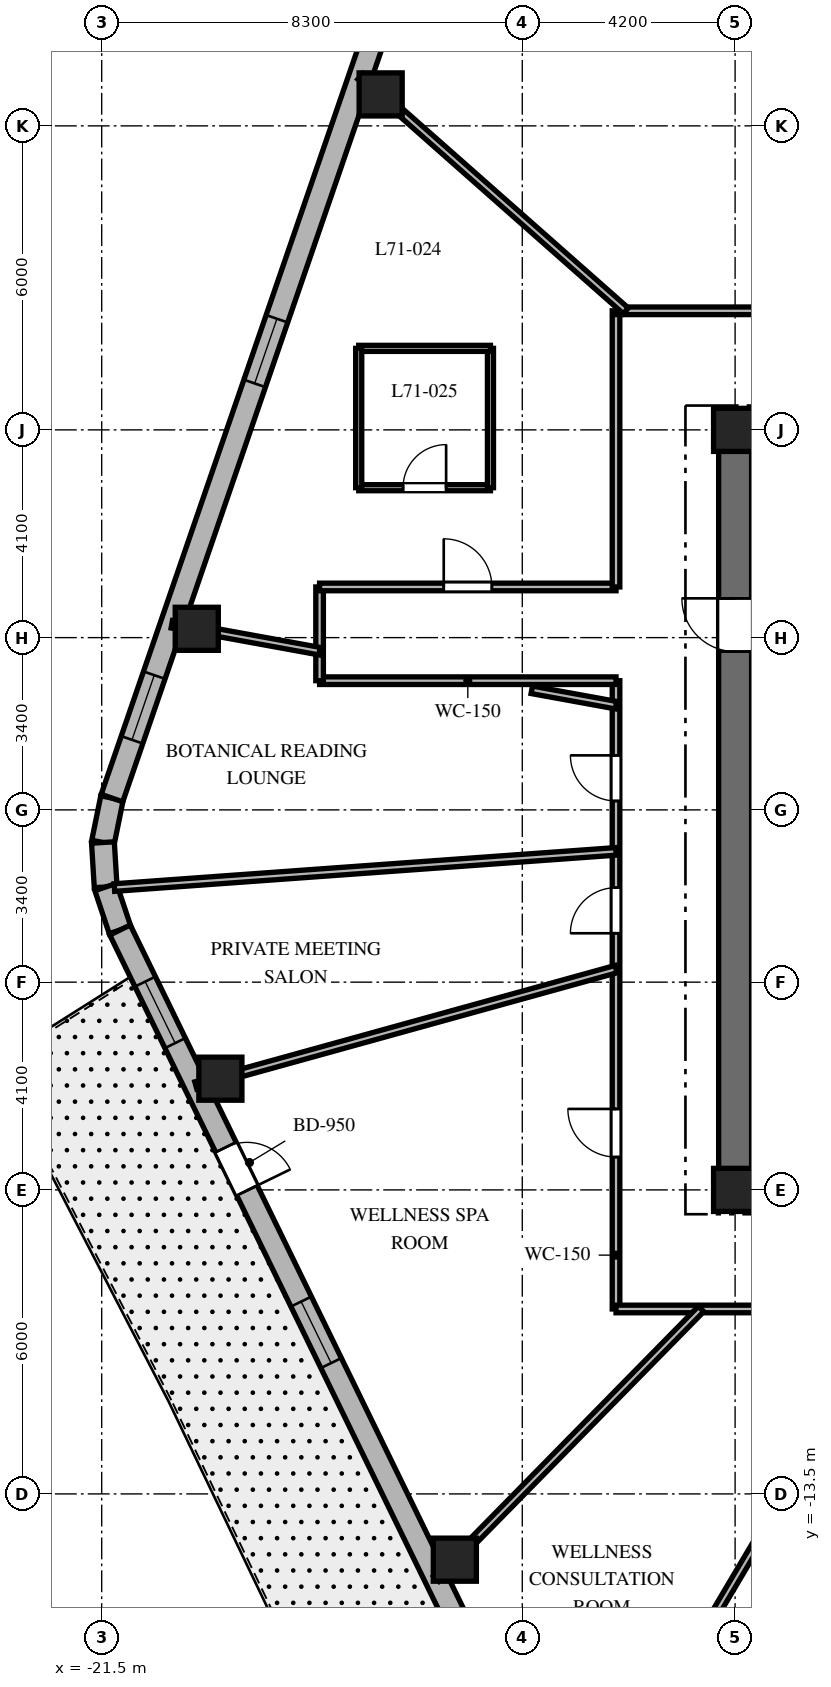
"""IFC4 building model, lengths in metres.
Left out: names, types, materials, properties, quantities, classifications, styles, units other than length and angle.
Written with IfcOpenShell. Run it as: python <this file> out.ifc"""

import sys

from ifc_helpers import new_model, si_unit, direction, frame, frame_2d, origin, origin_2d, place, context, subcontext, project, spatial, rectangle, extrude, element, fill, save


model = new_model("IFC4")
c1 = context("Model", 3, precision=1e-05, world=origin(), true_north=direction((0.0, 1.0)))
c2 = subcontext(c1, "Body", "Model", "MODEL_VIEW")
j1 = project(units=[si_unit("LENGTHUNIT", "METRE"), si_unit("PLANEANGLEUNIT", "RADIAN")], contexts=[c1])
p1 = place(None, origin())
s1 = spatial("IfcSite", under=j1, at=p1, CompositionType="ELEMENT")
p2 = place(p1, origin())
s2 = spatial("IfcBuilding", under=s1, at=p2, CompositionType="ELEMENT")
p3 = place(p2, frame((0.0, 0.0, 284.7)))
s3 = spatial("IfcBuildingStorey", under=s2, at=p3, CompositionType="ELEMENT", Elevation=284.7)
p4 = place(p3, frame((-9.325, -7.5, 0.0), z_axis=(0.0, 0.0, 1.0), x_axis=(1.0, 0.0, 0.0)))
e1 = element("IfcWall", 1, at=p4, inside=s3, PredefinedType="SHEAR", context=c2, shape_type="SweptSolid", body=[
    extrude(rectangle(XDim=18.65, YDim=0.65, at=frame_2d((9.325, 0.0))), origin(), (0.0, 0.0, 1.0), 3.9),
])
p5 = place(p4, frame((9.375, 0.0, 0.0)))
e2 = element("IfcOpeningElement", 2, at=p5, cuts=e1, PredefinedType="OPENING", context=c2, shape_type="SweptSolid", body=[
    extrude(rectangle(XDim=1.0, YDim=2.15, at=frame_2d((0.5, 1.075))), frame((0.0, 0.335, 0.0), z_axis=(0.0, -1.0, 0.0), x_axis=(1.0, 0.0, 0.0)), (0.0, 0.0, 1.0), 0.67),
])
p6 = place(p3, frame((-9.325, 7.5, 0.0), z_axis=(0.0, 0.0, 1.0), x_axis=(1.0, 0.0, 0.0)))
e3 = element("IfcWall", 3, at=p6, inside=s3, PredefinedType="SHEAR", context=c2, shape_type="SweptSolid", body=[
    extrude(rectangle(XDim=9.375, YDim=0.65, at=frame_2d((4.688, 0.0))), origin(), (0.0, 0.0, 1.0), 3.9),
])
p7 = place(p3, frame((-9.0, -7.175, 0.0), z_axis=(0.0, 0.0, 1.0), x_axis=(0.0, 1.0, 0.0)))
e4 = element("IfcWall", 4, at=p7, inside=s3, PredefinedType="SHEAR", context=c2, shape_type="SweptSolid", body=[
    extrude(rectangle(XDim=14.35, YDim=0.65, at=frame_2d((7.175, 0.0))), origin(), (0.0, 0.0, 1.0), 3.9),
])
p8 = place(p7, frame((10.3, 0.0, 0.0)))
e5 = element("IfcOpeningElement", 5, at=p8, cuts=e4, PredefinedType="OPENING", context=c2, shape_type="SweptSolid", body=[
    extrude(rectangle(XDim=1.05, YDim=2.15, at=frame_2d((0.525, 1.075))), frame((0.0, 0.335, 0.0), z_axis=(0.0, -1.0, 0.0), x_axis=(1.0, 0.0, 0.0)), (0.0, 0.0, 1.0), 0.67),
])
for number, where, z_axis, x_axis in (
    (6, (-9.0, -7.5, 0.0), (0.0, 0.0, 1.0), (1.0, 0.0, 0.0)),
    (7, (-9.0, 7.5, 0.0), (0.0, 0.0, 1.0), (1.0, 0.0, 0.0)),
    (8, (-15.995, 14.121, 0.0), (0.0, 0.0, 1.0), (1.0, 0.0, 0.0)),
    (9, (-19.624, 3.574, 0.0), (0.0, 0.0, 1.0), (1.0, 0.0, 0.0)),
    (10, (-19.158, -5.305, 0.0), (0.0, 0.0, 1.0), (1.0, 0.0, 0.0)),
    (11, (-14.531, -14.798, 0.0), (0.0, 0.0, 1.0), (1.0, 0.0, 0.0)),
):
    element("IfcColumn", number, at=place(p3, frame(where, z_axis=z_axis, x_axis=x_axis)), inside=s3, PredefinedType="COLUMN", context=c2, shape_type="SweptSolid", body=[
        extrude(rectangle(XDim=0.85, YDim=0.85, at=origin_2d()), origin(), (0.0, 0.0, 1.0), 3.9),
    ])
p9 = place(p3, frame((-21.298, 0.233, 0.0), z_axis=(0.0, 0.0, 1.0), x_axis=(-0.199158176661, -0.979967356941, 0.0)))
e12 = element("IfcWall", 12, at=p9, inside=s3, PredefinedType="SOLIDWALL", context=c2, shape_type="SweptSolid", body=[
    extrude(rectangle(XDim=0.895, YDim=0.45, at=frame_2d((0.447, 0.0))), origin(), (0.0, 0.0, 1.0), 3.58),
])
p10 = place(p3, frame((-21.476, -0.644, 0.0), z_axis=(0.0, 0.0, 1.0), x_axis=(0.061031097918, -0.998135865044, 0.0)))
e13 = element("IfcWall", 13, at=p10, inside=s3, PredefinedType="SOLIDWALL", context=c2, shape_type="SweptSolid", body=[
    extrude(rectangle(XDim=0.88, YDim=0.45, at=frame_2d((0.44, 0.0))), origin(), (0.0, 0.0, 1.0), 3.58),
])
p11 = place(p3, frame((-21.422, -1.522, 0.0), z_axis=(0.0, 0.0, 1.0), x_axis=(0.316964162323, -0.94843751497, 0.0)))
e14 = element("IfcWall", 14, at=p11, inside=s3, PredefinedType="SOLIDWALL", context=c2, shape_type="SweptSolid", body=[
    extrude(rectangle(XDim=0.895, YDim=0.45, at=frame_2d((0.448, 0.0))), origin(), (0.0, 0.0, 1.0), 3.58),
])
p12 = place(p3, frame((-15.26, 17.776, 0.0), z_axis=(0.0, 0.0, 1.0), x_axis=(-0.325407437101, -0.945573899745, 0.0)))
e15 = element("IfcWall", 15, at=p12, inside=s3, PredefinedType="SOLIDWALL", context=c2, shape_type="SweptSolid", body=[
    extrude(rectangle(XDim=18.552, YDim=0.45, at=frame_2d((9.276, 0.0))), origin(), (0.0, 0.0, 1.0), 3.58),
])
p13 = place(p12, frame((1.161, 0.0, 0.8)))
e16 = element("IfcOpeningElement", 16, at=p13, cuts=e15, PredefinedType="OPENING", context=c2, shape_type="SweptSolid", body=[
    extrude(rectangle(XDim=1.35, YDim=1.75, at=frame_2d((0.675, 0.875))), frame((0.0, 0.235, 0.0), z_axis=(0.0, -1.0, 0.0), x_axis=(1.0, 0.0, 0.0)), (0.0, 0.0, 1.0), 0.47),
])
p14 = place(p12, frame((8.548, 0.0, 0.8)))
e17 = element("IfcOpeningElement", 17, at=p14, cuts=e15, PredefinedType="OPENING", context=c2, shape_type="SweptSolid", body=[
    extrude(rectangle(XDim=1.35, YDim=1.75, at=frame_2d((0.675, 0.875))), frame((0.0, 0.235, 0.0), z_axis=(0.0, -1.0, 0.0), x_axis=(1.0, 0.0, 0.0)), (0.0, 0.0, 1.0), 0.47),
])
p15 = place(p12, frame((15.987, 0.0, 0.8)))
e18 = element("IfcOpeningElement", 18, at=p15, cuts=e15, PredefinedType="OPENING", context=c2, shape_type="SweptSolid", body=[
    extrude(rectangle(XDim=1.35, YDim=1.75, at=frame_2d((0.675, 0.875))), frame((0.0, 0.235, 0.0), z_axis=(0.0, -1.0, 0.0), x_axis=(1.0, 0.0, 0.0)), (0.0, 0.0, 1.0), 0.47),
])
p16 = place(p3, frame((-21.138, -2.371, 0.0), z_axis=(0.0, 0.0, 1.0), x_axis=(0.438128124058, -0.89891253574, 0.0)))
e19 = element("IfcWall", 19, at=p16, inside=s3, PredefinedType="SOLIDWALL", context=c2, shape_type="SweptSolid", body=[
    extrude(rectangle(XDim=17.565, YDim=0.45, at=frame_2d((8.782, 0.0))), origin(), (0.0, 0.0, 1.0), 3.58),
])
p17 = place(p16, frame((4.769, 0.0, 0.0)))
e20 = element("IfcOpeningElement", 20, at=p17, cuts=e19, PredefinedType="OPENING", context=c2, shape_type="SweptSolid", body=[
    extrude(rectangle(XDim=0.95, YDim=2.15, at=frame_2d((0.475, 1.075))), frame((0.0, 0.235, 0.0), z_axis=(0.0, -1.0, 0.0), x_axis=(1.0, 0.0, 0.0)), (0.0, 0.0, 1.0), 0.47),
])
p18 = place(p16, frame((1.133, 0.0, 0.8)))
e21 = element("IfcOpeningElement", 21, at=p18, cuts=e19, PredefinedType="OPENING", context=c2, shape_type="SweptSolid", body=[
    extrude(rectangle(XDim=1.35, YDim=1.75, at=frame_2d((0.675, 0.875))), frame((0.0, 0.235, 0.0), z_axis=(0.0, -1.0, 0.0), x_axis=(1.0, 0.0, 0.0)), (0.0, 0.0, 1.0), 0.47),
])
p19 = place(p16, frame((8.158, 0.0, 0.8)))
e22 = element("IfcOpeningElement", 22, at=p19, cuts=e19, PredefinedType="OPENING", context=c2, shape_type="SweptSolid", body=[
    extrude(rectangle(XDim=1.35, YDim=1.75, at=frame_2d((0.675, 0.875))), frame((0.0, 0.235, 0.0), z_axis=(0.0, -1.0, 0.0), x_axis=(1.0, 0.0, 0.0)), (0.0, 0.0, 1.0), 0.47),
])
p20 = place(p16, frame((15.132, 0.0, 0.8)))
e23 = element("IfcOpeningElement", 23, at=p20, cuts=e19, PredefinedType="OPENING", context=c2, shape_type="SweptSolid", body=[
    extrude(rectangle(XDim=1.35, YDim=1.75, at=frame_2d((0.675, 0.875))), frame((0.0, 0.235, 0.0), z_axis=(0.0, -1.0, 0.0), x_axis=(1.0, 0.0, 0.0)), (0.0, 0.0, 1.0), 0.47),
])
p21 = place(p3, frame((-11.35, -9.85, 0.0), z_axis=(0.0, 0.0, 1.0), x_axis=(0.0, 1.0, 0.0)))
e24 = element("IfcWall", 24, at=p21, inside=s3, PredefinedType="PARTITIONING", context=c2, shape_type="SweptSolid", body=[
    extrude(rectangle(XDim=12.4, YDim=0.15, at=frame_2d((6.2, 0.0))), origin(), (0.0, 0.0, 1.0), 3.07),
])
p22 = place(p21, frame((10.026, 0.0, 0.0)))
e25 = element("IfcOpeningElement", 25, at=p22, cuts=e24, PredefinedType="OPENING", context=c2, shape_type="SweptSolid", body=[
    extrude(rectangle(XDim=0.9, YDim=2.03, at=frame_2d((0.45, 1.015))), frame((0.0, 0.085, 0.0), z_axis=(0.0, -1.0, 0.0), x_axis=(1.0, 0.0, 0.0)), (0.0, 0.0, 1.0), 0.17),
])
p23 = place(p21, frame((7.415, 0.0, 0.0)))
e26 = element("IfcOpeningElement", 26, at=p23, cuts=e24, PredefinedType="OPENING", context=c2, shape_type="SweptSolid", body=[
    extrude(rectangle(XDim=0.9, YDim=2.03, at=frame_2d((0.45, 1.015))), frame((0.0, 0.085, 0.0), z_axis=(0.0, -1.0, 0.0), x_axis=(1.0, 0.0, 0.0)), (0.0, 0.0, 1.0), 0.17),
])
p24 = place(p21, frame((2.998, 0.0, 0.0)))
e27 = element("IfcOpeningElement", 27, at=p24, cuts=e24, PredefinedType="OPENING", context=c2, shape_type="SweptSolid", body=[
    extrude(rectangle(XDim=0.95, YDim=2.03, at=frame_2d((0.475, 1.015))), frame((0.0, 0.085, 0.0), z_axis=(0.0, -1.0, 0.0), x_axis=(1.0, 0.0, 0.0)), (0.0, 0.0, 1.0), 0.17),
])
p25 = place(p3, frame((-11.35, 2.55, 0.0), z_axis=(0.0, 0.0, 1.0), x_axis=(-1.0, 0.0, 0.0)))
e28 = element("IfcWall", 28, at=p25, inside=s3, PredefinedType="PARTITIONING", context=c2, shape_type="SweptSolid", body=[
    extrude(rectangle(XDim=5.85, YDim=0.15, at=frame_2d((2.925, 0.0))), origin(), (0.0, 0.0, 1.0), 3.021),
])
p26 = place(p3, frame((-17.2, 2.55, 0.0), z_axis=(0.0, 0.0, 1.0), x_axis=(0.0, 1.0, 0.0)))
e29 = element("IfcWall", 29, at=p26, inside=s3, PredefinedType="PARTITIONING", context=c2, shape_type="SweptSolid", body=[
    extrude(rectangle(XDim=1.85, YDim=0.15, at=frame_2d((0.925, 0.0))), origin(), (0.0, 0.0, 1.0), 3.07),
])
p27 = place(p3, frame((-17.2, 4.4, 0.0), z_axis=(0.0, 0.0, 1.0), x_axis=(1.0, 0.0, 0.0)))
e30 = element("IfcWall", 30, at=p27, inside=s3, PredefinedType="PARTITIONING", context=c2, shape_type="SweptSolid", body=[
    extrude(rectangle(XDim=5.85, YDim=0.15, at=frame_2d((2.925, 0.0))), origin(), (0.0, 0.0, 1.0), 3.021),
])
p28 = place(p27, frame((2.45, 0.0, 0.0)))
e31 = element("IfcOpeningElement", 31, at=p28, cuts=e30, PredefinedType="OPENING", context=c2, shape_type="SweptSolid", body=[
    extrude(rectangle(XDim=0.95, YDim=2.03, at=frame_2d((0.475, 1.015))), frame((0.0, 0.085, 0.0), z_axis=(0.0, -1.0, 0.0), x_axis=(1.0, 0.0, 0.0)), (0.0, 0.0, 1.0), 0.17),
])
p29 = place(p3, frame((-11.35, 4.4, 0.0), z_axis=(0.0, 0.0, 1.0), x_axis=(0.0, 1.0, 0.0)))
e32 = element("IfcWall", 32, at=p29, inside=s3, PredefinedType="PARTITIONING", context=c2, shape_type="SweptSolid", body=[
    extrude(rectangle(XDim=5.45, YDim=0.15, at=frame_2d((2.725, 0.0))), origin(), (0.0, 0.0, 1.0), 3.07),
])
p30 = place(p3, frame((-11.35, 9.85, 0.0), z_axis=(0.0, 0.0, 1.0), x_axis=(1.0, 0.0, 0.0)))
e33 = element("IfcWall", 33, at=p30, inside=s3, PredefinedType="PARTITIONING", context=c2, shape_type="SweptSolid", body=[
    extrude(rectangle(XDim=10.43, YDim=0.15, at=frame_2d((5.215, 0.0))), origin(), (0.0, 0.0, 1.0), 3.07),
])
p31 = place(p30, frame((8.382, 0.0, 0.0)))
e34 = element("IfcOpeningElement", 34, at=p31, cuts=e33, PredefinedType="OPENING", context=c2, shape_type="SweptSolid", body=[
    extrude(rectangle(XDim=0.95, YDim=2.03, at=frame_2d((0.475, 1.015))), frame((0.0, 0.085, 0.0), z_axis=(0.0, -1.0, 0.0), x_axis=(1.0, 0.0, 0.0)), (0.0, 0.0, 1.0), 0.17),
])
p32 = place(p30, frame((3.416, 0.0, 0.0)))
e35 = element("IfcOpeningElement", 35, at=p32, cuts=e33, PredefinedType="OPENING", context=c2, shape_type="SweptSolid", body=[
    extrude(rectangle(XDim=0.95, YDim=2.03, at=frame_2d((0.475, 1.015))), frame((0.0, 0.085, 0.0), z_axis=(0.0, -1.0, 0.0), x_axis=(1.0, 0.0, 0.0)), (0.0, 0.0, 1.0), 0.17),
])
p33 = place(p3, frame((-0.92, -9.85, 0.0), z_axis=(0.0, 0.0, 1.0), x_axis=(-1.0, 0.0, 0.0)))
e36 = element("IfcWall", 36, at=p33, inside=s3, PredefinedType="PARTITIONING", context=c2, shape_type="SweptSolid", body=[
    extrude(rectangle(XDim=10.43, YDim=0.15, at=frame_2d((5.215, 0.0))), origin(), (0.0, 0.0, 1.0), 3.07),
])
p34 = place(p33, frame((6.431, 0.0, 0.0)))
e37 = element("IfcOpeningElement", 37, at=p34, cuts=e36, PredefinedType="OPENING", context=c2, shape_type="SweptSolid", body=[
    extrude(rectangle(XDim=0.9, YDim=2.03, at=frame_2d((0.45, 1.015))), frame((0.0, 0.085, 0.0), z_axis=(0.0, -1.0, 0.0), x_axis=(1.0, 0.0, 0.0)), (0.0, 0.0, 1.0), 0.17),
])
p35 = place(p33, frame((3.052, 0.0, 0.0)))
e38 = element("IfcOpeningElement", 38, at=p35, cuts=e36, PredefinedType="OPENING", context=c2, shape_type="SweptSolid", body=[
    extrude(rectangle(XDim=0.9, YDim=2.03, at=frame_2d((0.45, 1.015))), frame((0.0, 0.085, 0.0), z_axis=(0.0, -1.0, 0.0), x_axis=(1.0, 0.0, 0.0)), (0.0, 0.0, 1.0), 0.17),
])
p36 = place(p3, frame((-11.157, 9.85, 0.0), z_axis=(0.0, 0.0, 1.0), x_axis=(-0.74966962095, 0.661812253909, 0.0)))
e39 = element("IfcWall", 39, at=p36, inside=s3, PredefinedType="PARTITIONING", context=c2, shape_type="SweptSolid", body=[
    extrude(rectangle(XDim=6.989, YDim=0.15, at=frame_2d((3.494, 0.0))), origin(), (0.0, 0.0, 1.0), 2.92),
])
p37 = place(p3, frame((-11.35, 2.067, 0.0), z_axis=(0.0, 0.0, 1.0), x_axis=(-0.983807459651, 0.179228575665, 0.0)))
e40 = element("IfcWall", 40, at=p37, inside=s3, PredefinedType="PARTITIONING", context=c2, shape_type="SweptSolid", body=[
    extrude(rectangle(XDim=1.69, YDim=0.15, at=frame_2d((0.845, 0.0))), origin(), (0.0, 0.0, 1.0), 3.58),
])
p38 = place(p3, frame((-17.2, 3.133, 0.0), z_axis=(0.0, 0.0, 1.0), x_axis=(-0.983817168797, 0.179175272791, 0.0)))
e41 = element("IfcWall", 41, at=p38, inside=s3, PredefinedType="PARTITIONING", context=c2, shape_type="SweptSolid", body=[
    extrude(rectangle(XDim=2.965, YDim=0.15, at=frame_2d((1.482, 0.0))), origin(), (0.0, 0.0, 1.0), 2.92),
])
p39 = place(p3, frame((-11.35, -0.819, 0.0), z_axis=(0.0, 0.0, 1.0), x_axis=(-0.997408384284, -0.071948001776, 0.0)))
e42 = element("IfcWall", 42, at=p39, inside=s3, PredefinedType="PARTITIONING", context=c2, shape_type="SweptSolid", body=[
    extrude(rectangle(XDim=9.925, YDim=0.15, at=frame_2d((4.963, 0.0))), origin(), (0.0, 0.0, 1.0), 2.92),
])
p40 = place(p3, frame((-11.35, -3.143, 0.0), z_axis=(0.0, 0.0, 1.0), x_axis=(-0.963731818141, -0.266872596386, 0.0)))
e43 = element("IfcWall", 43, at=p40, inside=s3, PredefinedType="PARTITIONING", context=c2, shape_type="SweptSolid", body=[
    extrude(rectangle(XDim=8.605, YDim=0.15, at=frame_2d((4.302, 0.0))), origin(), (0.0, 0.0, 1.0), 2.92),
])
p41 = place(p3, frame((-9.672, -9.85, 0.0), z_axis=(0.0, 0.0, 1.0), x_axis=(-0.700629771301, -0.713524998558, 0.0)))
e44 = element("IfcWall", 44, at=p41, inside=s3, PredefinedType="PARTITIONING", context=c2, shape_type="SweptSolid", body=[
    extrude(rectangle(XDim=7.459, YDim=0.15, at=frame_2d((3.73, 0.0))), origin(), (0.0, 0.0, 1.0), 2.92),
])
p42 = place(p3, frame((-5.833, -9.85, 0.0), z_axis=(0.0, 0.0, 1.0), x_axis=(-0.509561365941, -0.860434317272, 0.0)))
e45 = element("IfcWall", 45, at=p42, inside=s3, PredefinedType="PARTITIONING", context=c2, shape_type="SweptSolid", body=[
    extrude(rectangle(XDim=11.385, YDim=0.15, at=frame_2d((5.692, 0.0))), origin(), (0.0, 0.0, 1.0), 2.92),
])
p43 = place(p3, frame((-16.428, 6.359, 0.0), z_axis=(0.0, 0.0, 1.0), x_axis=(1.0, 0.0, 0.0)))
e46 = element("IfcWall", 46, at=p43, inside=s3, PredefinedType="PARTITIONING", context=c2, shape_type="SweptSolid", body=[
    extrude(rectangle(XDim=2.6, YDim=0.12, at=frame_2d((1.3, 0.0))), origin(), (0.0, 0.0, 1.0), 3.152),
])
p44 = place(p43, frame((0.875, 0.0, 0.0)))
e47 = element("IfcOpeningElement", 47, at=p44, cuts=e46, PredefinedType="OPENING", context=c2, shape_type="SweptSolid", body=[
    extrude(rectangle(XDim=0.85, YDim=2.03, at=frame_2d((0.425, 1.015))), frame((0.0, 0.07, 0.0), z_axis=(0.0, -1.0, 0.0), x_axis=(1.0, 0.0, 0.0)), (0.0, 0.0, 1.0), 0.14),
])
p45 = place(p3, frame((-13.828, 6.359, 0.0), z_axis=(0.0, 0.0, 1.0), x_axis=(0.0, 1.0, 0.0)))
e48 = element("IfcWall", 48, at=p45, inside=s3, PredefinedType="PARTITIONING", context=c2, shape_type="SweptSolid", body=[
    extrude(rectangle(XDim=2.75, YDim=0.12, at=frame_2d((1.375, 0.0))), origin(), (0.0, 0.0, 1.0), 3.58),
])
p46 = place(p3, frame((-13.828, 9.109, 0.0), z_axis=(0.0, 0.0, 1.0), x_axis=(-1.0, 0.0, 0.0)))
e49 = element("IfcWall", 49, at=p46, inside=s3, PredefinedType="PARTITIONING", context=c2, shape_type="SweptSolid", body=[
    extrude(rectangle(XDim=2.6, YDim=0.12, at=frame_2d((1.3, 0.0))), origin(), (0.0, 0.0, 1.0), 3.152),
])
p47 = place(p3, frame((-16.428, 9.109, 0.0), z_axis=(0.0, 0.0, 1.0), x_axis=(0.0, -1.0, 0.0)))
e50 = element("IfcWall", 50, at=p47, inside=s3, PredefinedType="PARTITIONING", context=c2, shape_type="SweptSolid", body=[
    extrude(rectangle(XDim=2.75, YDim=0.12, at=frame_2d((1.375, 0.0))), origin(), (0.0, 0.0, 1.0), 3.58),
])
p48 = place(p14, origin())
e51 = element("IfcWindow", 51, at=p48, inside=s3, PartitioningType="SINGLE_PANEL", PredefinedType="WINDOW", context=c2, shape_type="SweptSolid", body=[
    extrude(rectangle(XDim=1.35, YDim=1.75, at=frame_2d((0.675, 0.875))), frame((0.0, 0.03, 0.0), z_axis=(0.0, -1.0, 0.0), x_axis=(1.0, 0.0, 0.0)), (0.0, 0.0, 1.0), 0.06),
])
fill(e17, e51)
p49 = place(p15, origin())
e52 = element("IfcWindow", 52, at=p49, inside=s3, PartitioningType="SINGLE_PANEL", PredefinedType="WINDOW", context=c2, shape_type="SweptSolid", body=[
    extrude(rectangle(XDim=1.35, YDim=1.75, at=frame_2d((0.675, 0.875))), frame((0.0, 0.03, 0.0), z_axis=(0.0, -1.0, 0.0), x_axis=(1.0, 0.0, 0.0)), (0.0, 0.0, 1.0), 0.06),
])
fill(e18, e52)
p50 = place(p17, origin())
e53 = element("IfcDoor", 53, at=p50, inside=s3, OperationType="SINGLE_SWING_RIGHT", PredefinedType="DOOR", context=c2, shape_type="SweptSolid", body=[
    extrude(rectangle(XDim=0.95, YDim=2.15, at=frame_2d((0.475, 1.075))), frame((0.0, 0.025, 0.0), z_axis=(0.0, -1.0, 0.0), x_axis=(1.0, 0.0, 0.0)), (0.0, 0.0, 1.0), 0.05),
])
fill(e20, e53)
p51 = place(p18, origin())
e54 = element("IfcWindow", 54, at=p51, inside=s3, PartitioningType="SINGLE_PANEL", PredefinedType="WINDOW", context=c2, shape_type="SweptSolid", body=[
    extrude(rectangle(XDim=1.35, YDim=1.75, at=frame_2d((0.675, 0.875))), frame((0.0, 0.03, 0.0), z_axis=(0.0, -1.0, 0.0), x_axis=(1.0, 0.0, 0.0)), (0.0, 0.0, 1.0), 0.06),
])
fill(e21, e54)
p52 = place(p19, origin())
e55 = element("IfcWindow", 55, at=p52, inside=s3, PartitioningType="SINGLE_PANEL", PredefinedType="WINDOW", context=c2, shape_type="SweptSolid", body=[
    extrude(rectangle(XDim=1.35, YDim=1.75, at=frame_2d((0.675, 0.875))), frame((0.0, 0.03, 0.0), z_axis=(0.0, -1.0, 0.0), x_axis=(1.0, 0.0, 0.0)), (0.0, 0.0, 1.0), 0.06),
])
fill(e22, e55)
p53 = place(p8, origin())
e56 = element("IfcDoor", 56, at=p53, inside=s3, OperationType="SINGLE_SWING_RIGHT", PredefinedType="DOOR", context=c2, shape_type="SweptSolid", body=[
    extrude(rectangle(XDim=1.05, YDim=2.15, at=frame_2d((0.525, 1.075))), frame((0.0, 0.025, 0.0), z_axis=(0.0, -1.0, 0.0), x_axis=(1.0, 0.0, 0.0)), (0.0, 0.0, 1.0), 0.05),
])
fill(e5, e56)
p54 = place(p28, origin())
e57 = element("IfcDoor", 57, at=p54, inside=s3, OperationType="SINGLE_SWING_LEFT", PredefinedType="DOOR", context=c2, shape_type="SweptSolid", body=[
    extrude(rectangle(XDim=0.95, YDim=2.03, at=frame_2d((0.475, 1.015))), frame((0.0, 0.025, 0.0), z_axis=(0.0, -1.0, 0.0), x_axis=(1.0, 0.0, 0.0)), (0.0, 0.0, 1.0), 0.05),
])
fill(e31, e57)
p55 = place(p44, origin())
e58 = element("IfcDoor", 58, at=p55, inside=s3, OperationType="SINGLE_SWING_RIGHT", PredefinedType="DOOR", context=c2, shape_type="SweptSolid", body=[
    extrude(rectangle(XDim=0.85, YDim=2.03, at=frame_2d((0.425, 1.015))), frame((0.0, 0.025, 0.0), z_axis=(0.0, -1.0, 0.0), x_axis=(1.0, 0.0, 0.0)), (0.0, 0.0, 1.0), 0.05),
])
fill(e47, e58)
p56 = place(p22, origin())
e59 = element("IfcDoor", 59, at=p56, inside=s3, OperationType="SINGLE_SWING_RIGHT", PredefinedType="DOOR", context=c2, shape_type="SweptSolid", body=[
    extrude(rectangle(XDim=0.9, YDim=2.03, at=frame_2d((0.45, 1.015))), frame((0.0, 0.025, 0.0), z_axis=(0.0, -1.0, 0.0), x_axis=(1.0, 0.0, 0.0)), (0.0, 0.0, 1.0), 0.05),
])
fill(e25, e59)
p57 = place(p23, origin())
e60 = element("IfcDoor", 60, at=p57, inside=s3, OperationType="SINGLE_SWING_LEFT", PredefinedType="DOOR", context=c2, shape_type="SweptSolid", body=[
    extrude(rectangle(XDim=0.9, YDim=2.03, at=frame_2d((0.45, 1.015))), frame((0.0, 0.025, 0.0), z_axis=(0.0, -1.0, 0.0), x_axis=(1.0, 0.0, 0.0)), (0.0, 0.0, 1.0), 0.05),
])
fill(e26, e60)
p58 = place(p24, origin())
e61 = element("IfcDoor", 61, at=p58, inside=s3, OperationType="SINGLE_SWING_RIGHT", PredefinedType="DOOR", context=c2, shape_type="SweptSolid", body=[
    extrude(rectangle(XDim=0.95, YDim=2.03, at=frame_2d((0.475, 1.015))), frame((0.0, 0.025, 0.0), z_axis=(0.0, -1.0, 0.0), x_axis=(1.0, 0.0, 0.0)), (0.0, 0.0, 1.0), 0.05),
])
fill(e27, e61)
save(model, sys.argv[1])
